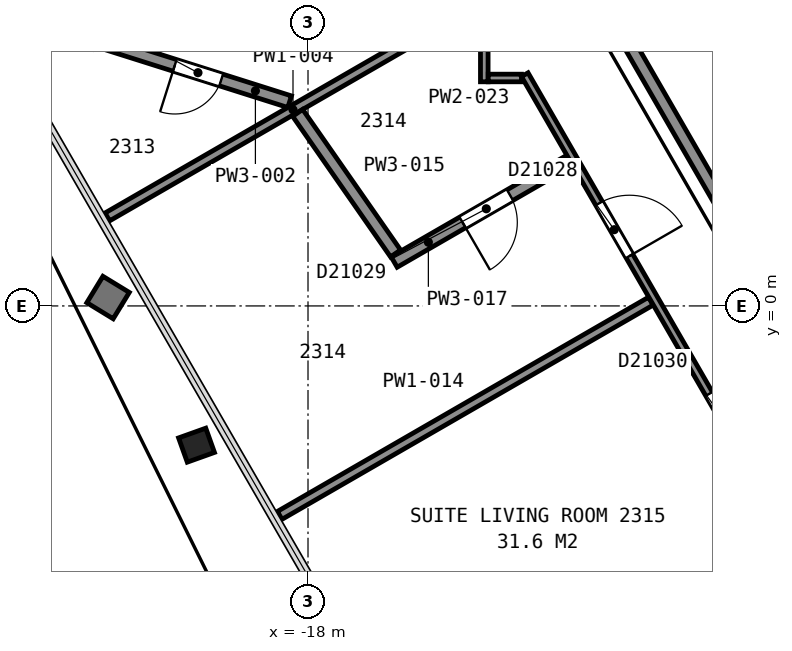
"""IFC4 building model, lengths in metres.
Left out: names, types, materials, properties, quantities, classifications, styles, units other than length and angle.
Written with IfcOpenShell. Run it as: python <this file> out.ifc"""

import sys

from ifc_helpers import new_model, si_unit, direction, frame, frame_2d, origin, origin_2d, place, context, subcontext, project, spatial, rectangle, i_section, extrude, element, fill, save


model = new_model("IFC4")
c1 = context("Model", 3, precision=1e-05, world=origin(), true_north=direction((0.0, 1.0)))
c2 = subcontext(c1, "Body", "Model", "MODEL_VIEW")
j1 = project(units=[si_unit("LENGTHUNIT", "METRE"), si_unit("PLANEANGLEUNIT", "RADIAN")], contexts=[c1])
p1 = place(None, origin())
s1 = spatial("IfcSite", under=j1, at=p1, CompositionType="ELEMENT")
p2 = place(p1, origin())
s2 = spatial("IfcBuilding", under=s1, at=p2, CompositionType="ELEMENT")
p3 = place(p2, frame((0.0, 0.0, 100.0)))
s3 = spatial("IfcBuildingStorey", under=s2, at=p3, CompositionType="ELEMENT", Elevation=100.0)
p4 = place(p3, frame((-19.617, -2.213, 0.04), z_axis=(-0.182620489527, -0.065386844425, 0.981006787632), x_axis=(-0.499563033841, 0.865557819508, -0.035304904861)))
e1 = element("IfcColumn", 1, at=p4, inside=s3, PredefinedType="COLUMN", context=c2, shape_type="SweptSolid", body=[
    extrude(i_section(OverallWidth=0.424, OverallDepth=0.475, WebThickness=0.048, FlangeThickness=0.077, FilletRadius=0.015, at=origin_2d()), origin(), (0.0, 0.0, 1.0), 3.588),
])
p5 = place(p3, frame((-7.678, 2.701, 0.0), z_axis=(0.0, 0.0, 1.0), x_axis=(-0.866026010844, 0.49999894854, 0.0)))
e2 = element("IfcWall", 2, at=p5, inside=s3, PredefinedType="PARTITIONING", context=c2, shape_type="SweptSolid", body=[
    extrude(rectangle(XDim=12.0, YDim=0.2, at=frame_2d((6.0, 0.0))), origin(), (0.0, 0.0, 1.0), 3.35),
])
p6 = place(p3, frame((-13.664, 5.946, 0.0), z_axis=(0.0, 0.0, 1.0), x_axis=(0.499994327219, -0.866028678941, 0.0)))
e3 = element("IfcWall", 3, at=p6, inside=s3, PredefinedType="PARTITIONING", context=c2, shape_type="SweptSolid", body=[
    extrude(rectangle(XDim=23.968, YDim=0.2, at=frame_2d((11.984, 0.0))), origin(), (0.0, 0.0, 1.0), 3.35),
])
p7 = place(p3, frame((-21.263, 4.296, 0.0), z_axis=(0.0, 0.0, 1.0), x_axis=(0.95341383314, -0.301665481582, 0.0)))
e4 = element("IfcWall", 4, at=p7, inside=s3, PredefinedType="PARTITIONING", context=c2, shape_type="SweptSolid", body=[
    extrude(rectangle(XDim=3.106, YDim=0.2, at=frame_2d((1.553, 0.0))), origin(), (0.0, 0.0, 1.0), 2.613),
])
p8 = place(p7, frame((1.125, 0.0, 0.0)))
e5 = element("IfcOpeningElement", 5, at=p8, cuts=e4, PredefinedType="OPENING", context=c2, shape_type="SweptSolid", body=[
    extrude(rectangle(XDim=0.8, YDim=2.1, at=frame_2d((0.4, 1.05))), frame((0.0, 0.11, 0.0), z_axis=(0.0, -1.0, 0.0), x_axis=(1.0, 0.0, 0.0)), (0.0, 0.0, 1.0), 0.22),
])
p9 = place(p3, frame((-21.301, 1.464, 0.0), z_axis=(0.0, 0.0, 1.0), x_axis=(0.866055299146, 0.49994821614, 0.0)))
e6 = element("IfcWall", 6, at=p9, inside=s3, PredefinedType="PARTITIONING", context=c2, shape_type="SweptSolid", body=[
    extrude(rectangle(XDim=7.052, YDim=0.15, at=frame_2d((3.526, 0.0))), origin(), (0.0, 0.0, 1.0), 2.613),
])
p10 = place(p3, frame((-18.466, -3.445, 0.0), z_axis=(0.0, 0.0, 1.0), x_axis=(0.86605175433, 0.499954356739, 0.0)))
e7 = element("IfcWall", 7, at=p10, inside=s3, PredefinedType="PARTITIONING", context=c2, shape_type="SweptSolid", body=[
    extrude(rectangle(XDim=7.048, YDim=0.15, at=frame_2d((3.524, 0.0))), origin(), (0.0, 0.0, 1.0), 2.613),
])
p11 = place(p3, frame((-18.17, 3.175, 0.0), z_axis=(0.0, 0.0, 1.0), x_axis=(0.571541682724, -0.820573034476, 0.0)))
e8 = element("IfcWall", 8, at=p11, inside=s3, PredefinedType="PARTITIONING", context=c2, shape_type="SweptSolid", body=[
    extrude(rectangle(XDim=2.818, YDim=0.2, at=frame_2d((1.409, 0.0))), origin(), (0.0, 0.0, 1.0), 2.613),
])
p12 = place(p3, frame((-16.583, 0.723, 0.0), z_axis=(0.0, 0.0, 1.0), x_axis=(0.866001642064, 0.500041154249, 0.0)))
e9 = element("IfcWall", 9, at=p12, inside=s3, PredefinedType="PARTITIONING", context=c2, shape_type="SweptSolid", body=[
    extrude(rectangle(XDim=3.338, YDim=0.2, at=frame_2d((1.669, 0.0))), origin(), (0.0, 0.0, 1.0), 2.613),
])
p13 = place(p12, frame((1.3, 0.0, 0.0)))
e10 = element("IfcOpeningElement", 10, at=p13, cuts=e9, PredefinedType="OPENING", context=c2, shape_type="SweptSolid", body=[
    extrude(rectangle(XDim=0.9, YDim=2.1, at=frame_2d((0.45, 1.05))), frame((0.0, 0.11, 0.0), z_axis=(0.0, -1.0, 0.0), x_axis=(1.0, 0.0, 0.0)), (0.0, 0.0, 1.0), 0.22),
])
p14 = place(p3, frame((-10.037, -3.94, 0.0), z_axis=(0.0, 0.0, 1.0), x_axis=(-0.866063951978, -0.499933226626, 0.0)))
e11 = element("IfcWall", 11, at=p14, inside=s3, PredefinedType="PARTITIONING", context=c2, shape_type="SweptSolid", body=[
    extrude(rectangle(XDim=7.052, YDim=0.1, at=frame_2d((3.526, 0.0))), origin(), (0.0, 0.0, 1.0), 2.613),
])
p15 = place(p14, frame((2.998, 0.0, 0.0)))
e12 = element("IfcOpeningElement", 12, at=p15, cuts=e11, PredefinedType="OPENING", context=c2, shape_type="SweptSolid", body=[
    extrude(rectangle(XDim=0.9, YDim=2.1, at=frame_2d((0.45, 1.05))), frame((0.0, 0.06, 0.0), z_axis=(0.0, -1.0, 0.0), x_axis=(1.0, 0.0, 0.0)), (0.0, 0.0, 1.0), 0.12),
])
p16 = place(p3, frame((-15.101, 3.687, 0.0), z_axis=(0.0, 0.0, 1.0), x_axis=(0.0, 1.0, 0.0)))
e13 = element("IfcWall", 13, at=p16, inside=s3, PredefinedType="PARTITIONING", context=c2, shape_type="SweptSolid", body=[
    extrude(rectangle(XDim=1.236, YDim=0.125, at=frame_2d((0.618, 0.0))), origin(), (0.0, 0.0, 1.0), 2.613),
])
p17 = place(p3, frame((-15.036, 3.749, 0.0), z_axis=(0.0, 0.0, 1.0), x_axis=(1.0, 0.0, 0.0)))
e14 = element("IfcWall", 14, at=p17, inside=s3, PredefinedType="PARTITIONING", context=c2, shape_type="SweptSolid", body=[
    extrude(rectangle(XDim=0.547, YDim=0.125, at=frame_2d((0.273, 0.0))), origin(), (0.0, 0.0, 1.0), 2.613),
])
p18 = place(p3, frame((-9.41, -4.902, 0.0), z_axis=(0.0, 0.0, 1.0), x_axis=(-0.499971244726, 0.866042005013, 0.0)))
e15 = element("IfcWall", 15, at=p18, inside=s3, PredefinedType="PARTITIONING", context=c2, shape_type="SweptSolid", body=[
    extrude(rectangle(XDim=10.052, YDim=0.125, at=frame_2d((5.026, 0.0))), origin(), (0.0, 0.0, 1.0), 2.613),
])
p19 = place(p18, frame((6.608, 0.0, 0.0)))
e16 = element("IfcOpeningElement", 16, at=p19, cuts=e15, PredefinedType="OPENING", context=c2, shape_type="SweptSolid", body=[
    extrude(rectangle(XDim=1.0, YDim=2.1, at=frame_2d((0.5, 1.05))), frame((0.0, 0.073, 0.0), z_axis=(0.0, -1.0, 0.0), x_axis=(1.0, 0.0, 0.0)), (0.0, 0.0, 1.0), 0.145),
])
p20 = place(p18, frame((2.989, 0.0, 0.0)))
e17 = element("IfcOpeningElement", 17, at=p20, cuts=e15, PredefinedType="OPENING", context=c2, shape_type="SweptSolid", body=[
    extrude(rectangle(XDim=1.0, YDim=2.1, at=frame_2d((0.5, 1.05))), frame((0.0, 0.073, 0.0), z_axis=(0.0, -1.0, 0.0), x_axis=(1.0, 0.0, 0.0)), (0.0, 0.0, 1.0), 0.145),
])
p21 = place(p8, origin())
e18 = element("IfcDoor", 18, at=p21, inside=s3, OperationType="SINGLE_SWING_LEFT", PredefinedType="DOOR", context=c2, shape_type="SweptSolid", body=[
    extrude(rectangle(XDim=0.8, YDim=2.1, at=frame_2d((0.4, 1.05))), frame((0.0, 0.025, 0.0), z_axis=(0.0, -1.0, 0.0), x_axis=(1.0, 0.0, 0.0)), (0.0, 0.0, 1.0), 0.05),
])
fill(e5, e18)
p22 = place(p13, origin())
e19 = element("IfcDoor", 19, at=p22, inside=s3, OperationType="SINGLE_SWING_LEFT", PredefinedType="DOOR", context=c2, shape_type="SweptSolid", body=[
    extrude(rectangle(XDim=0.9, YDim=2.1, at=frame_2d((0.45, 1.05))), frame((0.0, 0.025, 0.0), z_axis=(0.0, -1.0, 0.0), x_axis=(1.0, 0.0, 0.0)), (0.0, 0.0, 1.0), 0.05),
])
fill(e10, e19)
p23 = place(p19, origin())
e20 = element("IfcDoor", 20, at=p23, inside=s3, OperationType="SINGLE_SWING_LEFT", PredefinedType="DOOR", context=c2, shape_type="SweptSolid", body=[
    extrude(rectangle(XDim=1.0, YDim=2.1, at=frame_2d((0.5, 1.05))), frame((0.0, 0.025, 0.0), z_axis=(0.0, -1.0, 0.0), x_axis=(1.0, 0.0, 0.0)), (0.0, 0.0, 1.0), 0.05),
])
fill(e16, e20)
p24 = place(p20, origin())
e21 = element("IfcDoor", 21, at=p24, inside=s3, OperationType="SINGLE_SWING_LEFT", PredefinedType="DOOR", context=c2, shape_type="SweptSolid", body=[
    extrude(rectangle(XDim=1.0, YDim=2.1, at=frame_2d((0.5, 1.05))), frame((0.0, 0.025, 0.0), z_axis=(0.0, -1.0, 0.0), x_axis=(1.0, 0.0, 0.0)), (0.0, 0.0, 1.0), 0.05),
])
fill(e17, e21)
save(model, sys.argv[1])
